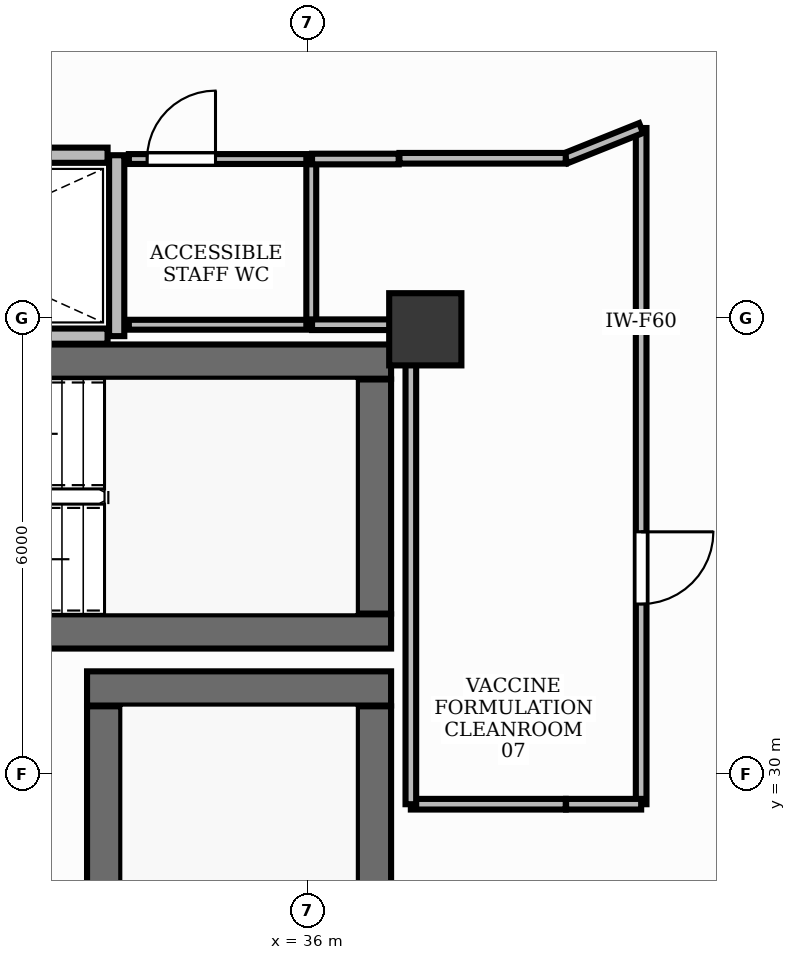
"""IFC4 building model, lengths in metres.
Left out: names, types, materials, properties, quantities, classifications, styles, units other than length and angle.
Written with IfcOpenShell. Run it as: python <this file> out.ifc"""

import sys

from ifc_helpers import new_model, si_unit, direction, frame, frame_2d, origin, origin_2d, place, context, subcontext, project, spatial, rectangle, extrude, element, fill, save


model = new_model("IFC4")
c1 = context("Model", 3, precision=1e-05, world=origin(), true_north=direction((0.0, 1.0)))
c2 = subcontext(c1, "Body", "Model", "MODEL_VIEW")
j1 = project(units=[si_unit("LENGTHUNIT", "METRE"), si_unit("PLANEANGLEUNIT", "RADIAN")], contexts=[c1])
p1 = place(None, origin())
s1 = spatial("IfcSite", under=j1, at=p1, CompositionType="ELEMENT")
p2 = place(p1, origin())
s2 = spatial("IfcBuilding", under=s1, at=p2, CompositionType="ELEMENT")
p3 = place(p2, frame((0.0, 0.0, 90.0)))
s3 = spatial("IfcBuildingStorey", under=s2, at=p3, CompositionType="ELEMENT", Elevation=90.0)
p4 = place(p3, frame((28.852, 35.425, 0.0), z_axis=(0.0, 0.0, 1.0), x_axis=(1.0, 0.0, 0.0)))
e1 = element("IfcWall", 1, at=p4, inside=s3, PredefinedType="SHEAR", context=c2, shape_type="SweptSolid", body=[
    extrude(rectangle(XDim=8.248, YDim=0.45, at=frame_2d((4.124, 0.0))), origin(), (0.0, 0.0, 1.0), 3.9),
])
p5 = place(p3, frame((28.35, 31.875, 0.0), z_axis=(0.0, 0.0, 1.0), x_axis=(1.0, 0.0, 0.0)))
e2 = element("IfcWall", 2, at=p5, inside=s3, PredefinedType="SHEAR", context=c2, shape_type="SweptSolid", body=[
    extrude(rectangle(XDim=8.75, YDim=0.45, at=frame_2d((4.375, 0.0))), origin(), (0.0, 0.0, 1.0), 3.9),
])
p6 = place(p3, frame((36.875, 32.11, 0.0), z_axis=(0.0, 0.0, 1.0), x_axis=(0.0, 1.0, 0.0)))
e3 = element("IfcWall", 3, at=p6, inside=s3, PredefinedType="SHEAR", context=c2, shape_type="SweptSolid", body=[
    extrude(rectangle(XDim=3.08, YDim=0.45, at=frame_2d((1.54, 0.0))), origin(), (0.0, 0.0, 1.0), 3.9),
])
p7 = place(p3, frame((33.1, 31.125, 0.0), z_axis=(0.0, 0.0, 1.0), x_axis=(1.0, 0.0, 0.0)))
e4 = element("IfcWall", 4, at=p7, inside=s3, PredefinedType="SHEAR", context=c2, shape_type="SweptSolid", body=[
    extrude(rectangle(XDim=4.0, YDim=0.45, at=frame_2d((2.0, 0.0))), origin(), (0.0, 0.0, 1.0), 3.9),
])
p8 = place(p3, frame((36.875, 23.11, 0.0), z_axis=(0.0, 0.0, 1.0), x_axis=(0.0, 1.0, 0.0)))
e5 = element("IfcWall", 5, at=p8, inside=s3, PredefinedType="SHEAR", context=c2, shape_type="SweptSolid", body=[
    extrude(rectangle(XDim=7.78, YDim=0.45, at=frame_2d((3.89, 0.0))), origin(), (0.0, 0.0, 1.0), 3.9),
])
p9 = place(p3, frame((33.325, 23.11, 0.0), z_axis=(0.0, 0.0, 1.0), x_axis=(0.0, 1.0, 0.0)))
e6 = element("IfcWall", 6, at=p9, inside=s3, PredefinedType="SHEAR", context=c2, shape_type="SweptSolid", body=[
    extrude(rectangle(XDim=7.78, YDim=0.45, at=frame_2d((3.89, 0.0))), origin(), (0.0, 0.0, 1.0), 3.9),
])
p10 = place(p9, frame((0.2, 0.0, 0.0)))
e7 = element("IfcOpeningElement", 7, at=p10, cuts=e6, PredefinedType="OPENING", context=c2, shape_type="SweptSolid", body=[
    extrude(rectangle(XDim=1.05, YDim=2.15, at=frame_2d((0.525, 1.075))), frame((0.0, 0.24, 0.0), z_axis=(0.0, -1.0, 0.0), x_axis=(1.0, 0.0, 0.0)), (0.0, 0.0, 1.0), 0.48),
])
p11 = place(p3, frame((37.55, 35.85, -0.0), z_axis=(0.0, 0.0, 1.0), x_axis=(1.0, 0.0, 0.0)))
e8 = element("IfcColumn", 8, at=p11, inside=s3, PredefinedType="PILASTER", context=c2, shape_type="SweptSolid", body=[
    extrude(rectangle(XDim=0.95, YDim=0.95, at=origin_2d()), origin(), (0.0, 0.0, 1.0), 3.901),
])
p12 = place(p3, frame((33.49, 35.76, 0.0), z_axis=(0.0, 0.0, 1.0), x_axis=(0.0, 1.0, 0.0)))
e9 = element("IfcWall", 9, at=p12, inside=s3, PredefinedType="PARTITIONING", context=c2, shape_type="SweptSolid", body=[
    extrude(rectangle(XDim=2.38, YDim=0.2, at=frame_2d((1.19, 0.0))), origin(), (0.0, 0.0, 1.0), 2.91),
])
for number, where, z_axis, x_axis in (
    (10, (28.8, 35.76, 0.0), (0.0, 0.0, 1.0), (1.0, 0.0, 0.0)),
    (11, (28.8, 38.14, 0.0), (0.0, 0.0, 1.0), (1.0, 0.0, 0.0)),
):
    element("IfcWall", number, at=place(p3, frame(where, z_axis=z_axis, x_axis=x_axis)), inside=s3, PredefinedType="PARTITIONING", context=c2, shape_type="SweptSolid", body=[
        extrude(rectangle(XDim=4.57, YDim=0.2, at=frame_2d((2.285, 0.0))), origin(), (0.0, 0.0, 1.0), 2.91),
    ])
p13 = place(p3, frame((33.65, 38.09, 0.0), z_axis=(0.0, 0.0, 1.0), x_axis=(1.0, 0.0, 0.0)))
e12 = element("IfcWall", 12, at=p13, inside=s3, PredefinedType="PARTITIONING", context=c2, shape_type="SweptSolid", body=[
    extrude(rectangle(XDim=2.4, YDim=0.13, at=frame_2d((1.2, 0.0))), origin(), (0.0, 0.0, 1.0), 2.91),
])
p14 = place(p13, frame((0.24, 0.0, 0.0)))
e13 = element("IfcOpeningElement", 13, at=p14, cuts=e12, PredefinedType="OPENING", context=c2, shape_type="SweptSolid", body=[
    extrude(rectangle(XDim=0.9, YDim=2.15, at=frame_2d((0.45, 1.075))), frame((0.0, 0.08, 0.0), z_axis=(0.0, -1.0, 0.0), x_axis=(1.0, 0.0, 0.0)), (0.0, 0.0, 1.0), 0.16),
])
p15 = place(p3, frame((40.39, 38.498, 0.0), z_axis=(0.0, 0.0, 1.0), x_axis=(0.0, -1.0, 0.0)))
e14 = element("IfcWall", 14, at=p15, inside=s3, PredefinedType="PARTITIONING", context=c2, shape_type="SweptSolid", body=[
    extrude(rectangle(XDim=8.896, YDim=0.14, at=frame_2d((4.448, 0.0))), origin(), (0.0, 0.0, 1.0), 2.91),
])
p16 = place(p15, frame((5.312, 0.0, 0.0)))
e15 = element("IfcOpeningElement", 15, at=p16, cuts=e14, PredefinedType="OPENING", context=c2, shape_type="SweptSolid", body=[
    extrude(rectangle(XDim=0.95, YDim=2.15, at=frame_2d((0.475, 1.075))), frame((0.0, 0.085, 0.0), z_axis=(0.0, -1.0, 0.0), x_axis=(1.0, 0.0, 0.0)), (0.0, 0.0, 1.0), 0.17),
])
p17 = place(p3, frame((36.05, 35.91, 0.0), z_axis=(0.0, 0.0, 1.0), x_axis=(-1.0, 0.0, 0.0)))
e16 = element("IfcWall", 16, at=p17, inside=s3, PredefinedType="PARTITIONING", context=c2, shape_type="SweptSolid", body=[
    extrude(rectangle(XDim=2.4, YDim=0.13, at=frame_2d((1.2, 0.0))), origin(), (0.0, 0.0, 1.0), 2.91),
])
p18 = place(p3, frame((36.05, 38.09, 0.0), z_axis=(0.0, 0.0, 1.0), x_axis=(0.0, -1.0, 0.0)))
e17 = element("IfcWall", 17, at=p18, inside=s3, PredefinedType="PARTITIONING", context=c2, shape_type="SweptSolid", body=[
    extrude(rectangle(XDim=2.18, YDim=0.13, at=frame_2d((1.09, 0.0))), origin(), (0.0, 0.0, 1.0), 2.91),
])
p19 = place(p3, frame((39.398, 38.1, 0.0), z_axis=(0.0, 0.0, 1.0), x_axis=(0.928098124006, 0.372335698284, 0.0)))
e18 = element("IfcWall", 18, at=p19, inside=s3, PredefinedType="PARTITIONING", context=c2, shape_type="SweptSolid", body=[
    extrude(rectangle(XDim=1.069, YDim=0.14, at=frame_2d((0.534, 0.0))), origin(), (0.0, 0.0, 1.0), 2.91),
])
p20 = place(p3, frame((40.39, 29.602, 0.0), z_axis=(0.0, 0.0, 1.0), x_axis=(-1.0, 0.0, 0.0)))
e19 = element("IfcWall", 19, at=p20, inside=s3, PredefinedType="PARTITIONING", context=c2, shape_type="SweptSolid", body=[
    extrude(rectangle(XDim=0.988, YDim=0.14, at=frame_2d((0.494, 0.0))), origin(), (0.0, 0.0, 1.0), 2.91),
])
p21 = place(p3, frame((39.398, 29.602, 0.0), z_axis=(0.0, 0.0, 1.0), x_axis=(-1.0, 0.0, 0.0)))
e20 = element("IfcWall", 20, at=p21, inside=s3, PredefinedType="PARTITIONING", context=c2, shape_type="SweptSolid", body=[
    extrude(rectangle(XDim=2.038, YDim=0.14, at=frame_2d((1.019, 0.0))), origin(), (0.0, 0.0, 1.0), 2.91),
])
p22 = place(p3, frame((37.36, 29.602, 0.0), z_axis=(0.0, 0.0, 1.0), x_axis=(0.0, 1.0, 0.0)))
e21 = element("IfcWall", 21, at=p22, inside=s3, PredefinedType="PARTITIONING", context=c2, shape_type="SweptSolid", body=[
    extrude(rectangle(XDim=6.298, YDim=0.14, at=frame_2d((3.149, 0.0))), origin(), (0.0, 0.0, 1.0), 2.91),
])
p23 = place(p3, frame((37.35, 35.91, 0.0), z_axis=(0.0, 0.0, 1.0), x_axis=(-1.0, 0.0, 0.0)))
e22 = element("IfcWall", 22, at=p23, inside=s3, PredefinedType="PARTITIONING", context=c2, shape_type="SweptSolid", body=[
    extrude(rectangle(XDim=1.29, YDim=0.14, at=frame_2d((0.645, 0.0))), origin(), (0.0, 0.0, 1.0), 2.91),
])
p24 = place(p3, frame((36.06, 38.09, 0.0), z_axis=(0.0, 0.0, 1.0), x_axis=(1.0, 0.0, 0.0)))
e23 = element("IfcWall", 23, at=p24, inside=s3, PredefinedType="PARTITIONING", context=c2, shape_type="SweptSolid", body=[
    extrude(rectangle(XDim=1.14, YDim=0.14, at=frame_2d((0.57, 0.0))), origin(), (0.0, 0.0, 1.0), 2.91),
])
p25 = place(p3, frame((37.21, 38.1, 0.0), z_axis=(0.0, 0.0, 1.0), x_axis=(1.0, 0.0, 0.0)))
e24 = element("IfcWall", 24, at=p25, inside=s3, PredefinedType="PARTITIONING", context=c2, shape_type="SweptSolid", body=[
    extrude(rectangle(XDim=2.188, YDim=0.14, at=frame_2d((1.094, 0.0))), origin(), (0.0, 0.0, 1.0), 2.91),
])
p26 = place(p14, origin())
e25 = element("IfcDoor", 25, at=p26, inside=s3, OperationType="SINGLE_SWING_RIGHT", PredefinedType="DOOR", context=c2, shape_type="SweptSolid", body=[
    extrude(rectangle(XDim=0.9, YDim=2.15, at=frame_2d((0.45, 1.075))), frame((0.0, 0.025, 0.0), z_axis=(0.0, -1.0, 0.0), x_axis=(1.0, 0.0, 0.0)), (0.0, 0.0, 1.0), 0.05),
])
fill(e13, e25)
p27 = place(p16, origin())
e26 = element("IfcDoor", 26, at=p27, inside=s3, OperationType="SINGLE_SWING_LEFT", PredefinedType="DOOR", context=c2, shape_type="SweptSolid", body=[
    extrude(rectangle(XDim=0.95, YDim=2.15, at=frame_2d((0.475, 1.075))), frame((0.0, 0.025, 0.0), z_axis=(0.0, -1.0, 0.0), x_axis=(1.0, 0.0, 0.0)), (0.0, 0.0, 1.0), 0.05),
])
fill(e15, e26)
save(model, sys.argv[1])
